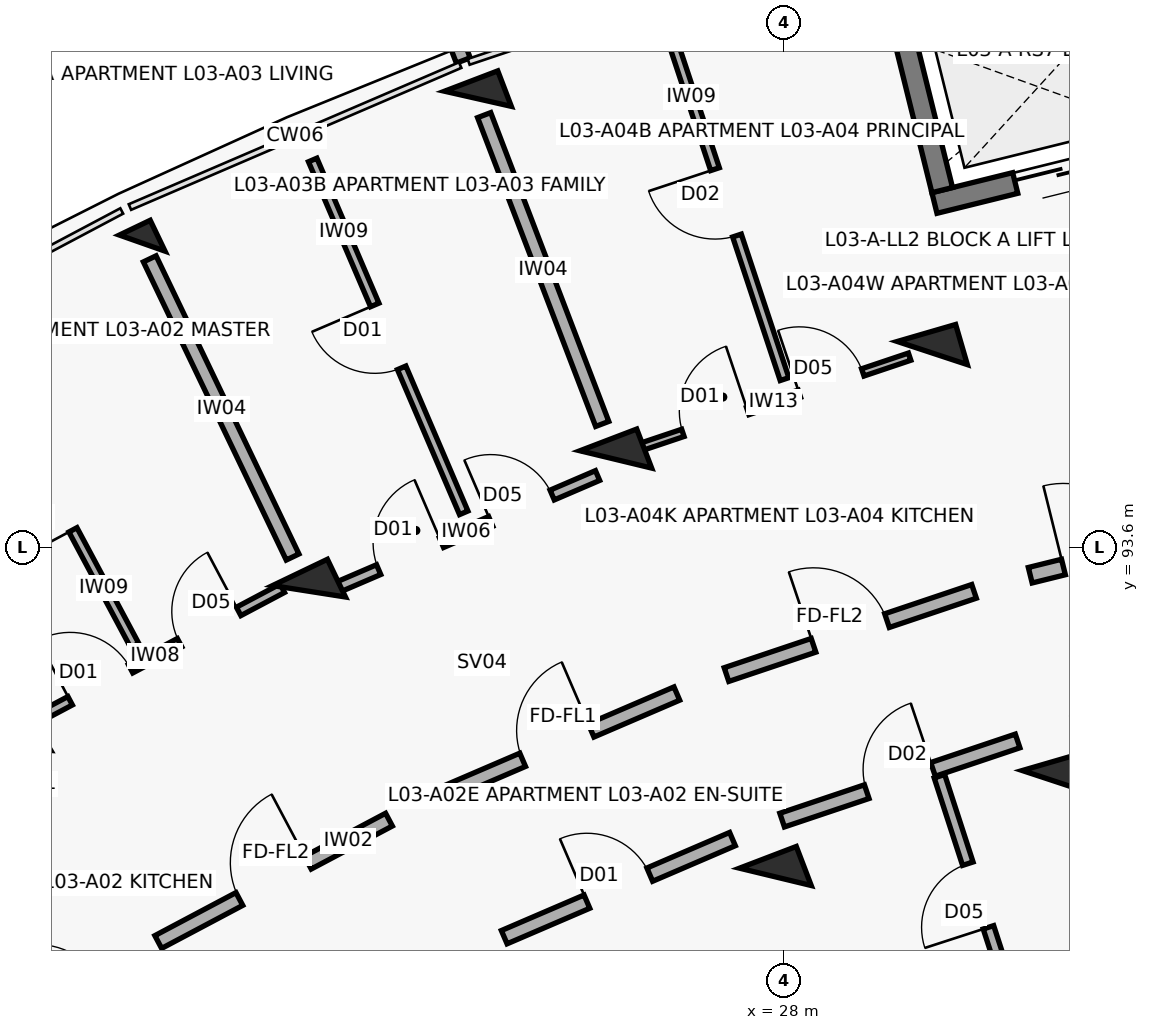
"""IFC4 building model, lengths in metres.
Left out: names, types, materials, properties, quantities, classifications, styles, units other than length and angle.
Written with IfcOpenShell. Run it as: python <this file> out.ifc"""

import sys

from ifc_helpers import new_model, si_unit, direction, frame, frame_2d, origin, origin_2d, place, context, subcontext, project, spatial, rectangle, extrude, element, fill, save


model = new_model("IFC4")
c1 = context("Model", 3, precision=1e-05, world=origin(), true_north=direction((0.0, 1.0)))
c2 = subcontext(c1, "Body", "Model", "MODEL_VIEW")
j1 = project(units=[si_unit("LENGTHUNIT", "METRE"), si_unit("PLANEANGLEUNIT", "RADIAN")], contexts=[c1])
p1 = place(None, origin())
s1 = spatial("IfcSite", under=j1, at=p1, CompositionType="ELEMENT")
p2 = place(p1, origin())
s2 = spatial("IfcBuilding", under=s1, at=p2, CompositionType="ELEMENT")
p3 = place(p2, frame((0.0, 0.0, 11.2)))
s3 = spatial("IfcBuildingStorey", under=s2, at=p3, CompositionType="ELEMENT", Elevation=11.2)
p4 = place(p3, frame((21.754, 93.019, 0.0), z_axis=(0.0, 0.0, 1.0), x_axis=(-0.432085748802, 0.901832526405, 0.0)))
e1 = element("IfcColumn", 1, at=p4, inside=s3, PredefinedType="COLUMN", context=c2, shape_type="SweptSolid", body=[
    extrude(rectangle(XDim=0.55, YDim=0.8, at=origin_2d()), origin(), (0.0, 0.0, 1.0), 3.1),
])
p5 = place(p3, frame((19.559, 97.6, 0.0), z_axis=(0.0, 0.0, 1.0), x_axis=(-0.432085748802, 0.901832526405, 0.0)))
e2 = element("IfcColumn", 2, at=p5, inside=s3, PredefinedType="COLUMN", context=c2, shape_type="SweptSolid", body=[
    extrude(rectangle(XDim=0.45, YDim=0.45, at=origin_2d()), origin(), (0.0, 0.0, 1.0), 3.1),
])
for number, where, z_axis, x_axis in (
    (3, (27.889, 89.261, 0.0), (0.0, 0.0, 1.0), (-0.357, 0.934, 0.0)),
    (4, (25.79, 94.753, 0.0), (0.0, 0.0, 1.0), (-0.357, 0.934, 0.0)),
):
    element("IfcColumn", number, at=place(p3, frame(where, z_axis=z_axis, x_axis=x_axis)), inside=s3, PredefinedType="COLUMN", context=c2, shape_type="SweptSolid", body=[
        extrude(rectangle(XDim=0.55, YDim=0.8, at=origin_2d()), origin(), (0.0, 0.0, 1.0), 3.1),
    ])
p6 = place(p3, frame((23.976, 99.499, 0.0), z_axis=(0.0, 0.0, 1.0), x_axis=(-0.357064076459, 0.934079892355, 0.0)))
e5 = element("IfcColumn", 5, at=p6, inside=s3, PredefinedType="COLUMN", context=c2, shape_type="SweptSolid", body=[
    extrude(rectangle(XDim=0.5, YDim=0.75, at=origin_2d()), origin(), (0.0, 0.0, 1.0), 3.1),
])
for number, where, z_axis, x_axis in (
    (6, (31.599, 90.508, 0.0), (0.0, 0.0, 1.0), (-0.28, 0.96, 0.0)),
    (7, (29.954, 96.153, 0.0), (0.0, 0.0, 1.0), (-0.28, 0.96, 0.0)),
):
    element("IfcColumn", number, at=place(p3, frame(where, z_axis=z_axis, x_axis=x_axis)), inside=s3, PredefinedType="COLUMN", context=c2, shape_type="SweptSolid", body=[
        extrude(rectangle(XDim=0.55, YDim=0.8, at=origin_2d()), origin(), (0.0, 0.0, 1.0), 3.1),
    ])
p7 = place(p3, frame((23.783, 100.003, 0.0), z_axis=(0.0, 0.0, 1.0), x_axis=(-0.356942580168, 0.934126326823, 0.0)))
e8 = element("IfcWall", 8, at=p7, inside=s3, PredefinedType="PARAPET", context=c2, shape_type="SweptSolid", body=[
    extrude(rectangle(XDim=0.9, YDim=0.195, at=frame_2d((0.45, 0.0))), origin(), (0.0, 0.0, 1.0), 2.25),
])
p8 = place(p3, frame((33.273, 98.942, 0.0), z_axis=(0.0, 0.0, 1.0), x_axis=(-0.970707542441, -0.240264160972, 0.0)))
e9 = element("IfcWall", 9, at=p8, inside=s3, PredefinedType="SHEAR", context=c2, shape_type="SweptSolid", body=[
    extrude(rectangle(XDim=3.39, YDim=0.28, at=frame_2d((1.695, 0.0))), origin(), (0.0, 0.0, 1.0), 3.1),
])
p9 = place(p8, frame((1.095, 0.0, 0.0)))
e10 = element("IfcOpeningElement", 10, at=p9, cuts=e9, PredefinedType="OPENING", context=c2, shape_type="SweptSolid", body=[
    extrude(rectangle(XDim=1.2, YDim=2.15, at=frame_2d((0.6, 1.075))), frame((0.0, 0.15, 0.0), z_axis=(0.0, -1.0, 0.0), x_axis=(1.0, 0.0, 0.0)), (0.0, 0.0, 1.0), 0.3),
])
p10 = place(p3, frame((30.085, 98.297, 0.0), z_axis=(0.0, 0.0, 1.0), x_axis=(-0.2402993748, 0.970698825832, 0.0)))
e11 = element("IfcWall", 11, at=p10, inside=s3, PredefinedType="SHEAR", context=c2, shape_type="SweptSolid", body=[
    extrude(rectangle(XDim=2.03, YDim=0.28, at=frame_2d((1.015, 0.0))), origin(), (0.0, 0.0, 1.0), 3.1),
])
p11 = place(p3, frame((19.77, 88.404, 0.0), z_axis=(0.0, 0.0, 1.0), x_axis=(0.883410853063, 0.468599258099, 0.0)))
e12 = element("IfcWall", 12, at=p11, inside=s3, PredefinedType="SOLIDWALL", context=c2, shape_type="SweptSolid", body=[
    extrude(rectangle(XDim=3.436, YDim=0.19, at=frame_2d((1.718, 0.0))), origin(), (0.0, 0.0, 1.0), 2.08),
])
p12 = place(p11, frame((1.208, 0.0, 0.0)))
e13 = element("IfcOpeningElement", 13, at=p12, cuts=e12, PredefinedType="OPENING", context=c2, shape_type="SweptSolid", body=[
    extrude(rectangle(XDim=1.02, YDim=2.15, at=frame_2d((0.51, 1.075))), frame((0.0, 0.105, 0.0), z_axis=(0.0, -1.0, 0.0), x_axis=(1.0, 0.0, 0.0)), (0.0, 0.0, 1.0), 0.21),
])
p13 = place(p3, frame((18.037, 91.273, 0.0), z_axis=(0.0, 0.0, 1.0), x_axis=(0.883441603894, 0.468541281543, 0.0)))
e14 = element("IfcWall", 14, at=p13, inside=s3, PredefinedType="PARTITIONING", context=c2, shape_type="SweptSolid", body=[
    extrude(rectangle(XDim=3.81, YDim=0.125, at=frame_2d((1.905, 0.0))), origin(), (0.0, 0.0, 1.0), 2.08),
])
p14 = place(p13, frame((0.65, 0.0, 0.0)))
e15 = element("IfcOpeningElement", 15, at=p14, cuts=e14, PredefinedType="OPENING", context=c2, shape_type="SweptSolid", body=[
    extrude(rectangle(XDim=0.9, YDim=2.1, at=frame_2d((0.45, 1.05))), frame((0.0, 0.073, 0.0), z_axis=(0.0, -1.0, 0.0), x_axis=(1.0, 0.0, 0.0)), (0.0, 0.0, 1.0), 0.145),
])
p15 = place(p13, frame((2.28, 0.0, 0.0)))
e16 = element("IfcOpeningElement", 16, at=p15, cuts=e14, PredefinedType="OPENING", context=c2, shape_type="SweptSolid", body=[
    extrude(rectangle(XDim=0.88, YDim=2.1, at=frame_2d((0.44, 1.05))), frame((0.0, 0.073, 0.0), z_axis=(0.0, -1.0, 0.0), x_axis=(1.0, 0.0, 0.0)), (0.0, 0.0, 1.0), 0.145),
])
p16 = place(p3, frame((19.46, 92.306, 0.0), z_axis=(0.0, 0.0, 1.0), x_axis=(-0.471228378949, 0.88201123285, 0.0)))
e17 = element("IfcWall", 17, at=p16, inside=s3, PredefinedType="PARTITIONING", context=c2, shape_type="SweptSolid", body=[
    extrude(rectangle(XDim=4.75, YDim=0.12, at=frame_2d((2.375, 0.0))), origin(), (0.0, 0.0, 1.0), 2.08),
])
p17 = place(p16, frame((1.725, 0.0, 0.0)))
e18 = element("IfcOpeningElement", 18, at=p17, cuts=e17, PredefinedType="OPENING", context=c2, shape_type="SweptSolid", body=[
    extrude(rectangle(XDim=1.3, YDim=2.1, at=frame_2d((0.65, 1.05))), frame((0.0, 0.07, 0.0), z_axis=(0.0, -1.0, 0.0), x_axis=(1.0, 0.0, 0.0)), (0.0, 0.0, 1.0), 0.14),
])
p18 = place(p3, frame((23.437, 90.316, 0.0), z_axis=(0.0, 0.0, 1.0), x_axis=(0.918718172399, 0.394913813008, 0.0)))
e19 = element("IfcWall", 19, at=p18, inside=s3, PredefinedType="SOLIDWALL", context=c2, shape_type="SweptSolid", body=[
    extrude(rectangle(XDim=3.436, YDim=0.19, at=frame_2d((1.718, 0.0))), origin(), (0.0, 0.0, 1.0), 2.08),
])
p19 = place(p18, frame((1.228, 0.0, 0.0)))
e20 = element("IfcOpeningElement", 20, at=p19, cuts=e19, PredefinedType="OPENING", context=c2, shape_type="SweptSolid", body=[
    extrude(rectangle(XDim=0.98, YDim=2.15, at=frame_2d((0.49, 1.075))), frame((0.0, 0.105, 0.0), z_axis=(0.0, -1.0, 0.0), x_axis=(1.0, 0.0, 0.0)), (0.0, 0.0, 1.0), 0.21),
])
p20 = place(p3, frame((24.322, 88.467, 0.0), z_axis=(0.0, 0.0, 1.0), x_axis=(0.918723391052, 0.394901672235, 0.0)))
e21 = element("IfcWall", 21, at=p20, inside=s3, PredefinedType="SOLIDWALL", context=c2, shape_type="SweptSolid", body=[
    extrude(rectangle(XDim=3.269, YDim=0.19, at=frame_2d((1.634, 0.0))), origin(), (0.0, 0.0, 1.0), 2.08),
])
p21 = place(p20, frame((1.184, 0.0, 0.0)))
e22 = element("IfcOpeningElement", 22, at=p21, cuts=e21, PredefinedType="OPENING", context=c2, shape_type="SweptSolid", body=[
    extrude(rectangle(XDim=0.9, YDim=2.1, at=frame_2d((0.45, 1.05))), frame((0.0, 0.105, 0.0), z_axis=(0.0, -1.0, 0.0), x_axis=(1.0, 0.0, 0.0)), (0.0, 0.0, 1.0), 0.21),
])
p22 = place(p3, frame((22.073, 93.047, 0.0), z_axis=(0.0, 0.0, 1.0), x_axis=(0.918737522346, 0.394868794707, 0.0)))
e23 = element("IfcWall", 23, at=p22, inside=s3, PredefinedType="PARTITIONING", context=c2, shape_type="SweptSolid", body=[
    extrude(rectangle(XDim=3.785, YDim=0.14, at=frame_2d((1.893, 0.0))), origin(), (0.0, 0.0, 1.0), 2.08),
])
p23 = place(p22, frame((0.65, 0.0, 0.0)))
e24 = element("IfcOpeningElement", 24, at=p23, cuts=e23, PredefinedType="OPENING", context=c2, shape_type="SweptSolid", body=[
    extrude(rectangle(XDim=0.9, YDim=2.1, at=frame_2d((0.45, 1.05))), frame((0.0, 0.08, 0.0), z_axis=(0.0, -1.0, 0.0), x_axis=(1.0, 0.0, 0.0)), (0.0, 0.0, 1.0), 0.16),
])
p24 = place(p22, frame((2.255, 0.0, 0.0)))
e25 = element("IfcOpeningElement", 25, at=p24, cuts=e23, PredefinedType="OPENING", context=c2, shape_type="SweptSolid", body=[
    extrude(rectangle(XDim=0.88, YDim=2.1, at=frame_2d((0.44, 1.05))), frame((0.0, 0.08, 0.0), z_axis=(0.0, -1.0, 0.0), x_axis=(1.0, 0.0, 0.0)), (0.0, 0.0, 1.0), 0.16),
])
p25 = place(p3, frame((23.789, 94.051, 0.0), z_axis=(0.0, 0.0, 1.0), x_axis=(-0.393539995583, 0.919307495823, 0.0)))
e26 = element("IfcWall", 26, at=p25, inside=s3, PredefinedType="PARTITIONING", context=c2, shape_type="SweptSolid", body=[
    extrude(rectangle(XDim=5.05, YDim=0.12, at=frame_2d((2.525, 0.0))), origin(), (0.0, 0.0, 1.0), 2.08),
])
p26 = place(p25, frame((2.075, 0.0, 0.0)))
e27 = element("IfcOpeningElement", 27, at=p26, cuts=e26, PredefinedType="OPENING", context=c2, shape_type="SweptSolid", body=[
    extrude(rectangle(XDim=0.9, YDim=2.1, at=frame_2d((0.45, 1.05))), frame((0.0, 0.07, 0.0), z_axis=(0.0, -1.0, 0.0), x_axis=(1.0, 0.0, 0.0)), (0.0, 0.0, 1.0), 0.14),
])
p27 = place(p3, frame((21.538, 93.469, 0.0), z_axis=(0.0, 0.0, 1.0), x_axis=(-0.432086898897, 0.901831975371, 0.0)))
e28 = element("IfcWall", 28, at=p27, inside=s3, PredefinedType="SOLIDWALL", context=c2, shape_type="SweptSolid", body=[
    extrude(rectangle(XDim=4.35, YDim=0.185, at=frame_2d((2.175, 0.0))), origin(), (0.0, 0.0, 1.0), 2.08),
])
p28 = place(p3, frame((27.247, 91.923, 0.0), z_axis=(0.0, 0.0, 1.0), x_axis=(0.947863007629, 0.318678080151, 0.0)))
e29 = element("IfcWall", 29, at=p28, inside=s3, PredefinedType="SOLIDWALL", context=c2, shape_type="SweptSolid", body=[
    extrude(rectangle(XDim=3.436, YDim=0.19, at=frame_2d((1.718, 0.0))), origin(), (0.0, 0.0, 1.0), 2.08),
])
p29 = place(p28, frame((1.208, 0.0, 0.0)))
e30 = element("IfcOpeningElement", 30, at=p29, cuts=e29, PredefinedType="OPENING", context=c2, shape_type="SweptSolid", body=[
    extrude(rectangle(XDim=1.02, YDim=2.15, at=frame_2d((0.51, 1.075))), frame((0.0, 0.105, 0.0), z_axis=(0.0, -1.0, 0.0), x_axis=(1.0, 0.0, 0.0)), (0.0, 0.0, 1.0), 0.21),
])
p30 = place(p3, frame((27.979, 90.008, 0.0), z_axis=(0.0, 0.0, 1.0), x_axis=(0.94787351033, 0.318646839643, 0.0)))
e31 = element("IfcWall", 31, at=p30, inside=s3, PredefinedType="SOLIDWALL", context=c2, shape_type="SweptSolid", body=[
    extrude(rectangle(XDim=3.269, YDim=0.19, at=frame_2d((1.634, 0.0))), origin(), (0.0, 0.0, 1.0), 2.08),
])
p31 = place(p30, frame((1.174, 0.0, 0.0)))
e32 = element("IfcOpeningElement", 32, at=p31, cuts=e31, PredefinedType="OPENING", context=c2, shape_type="SweptSolid", body=[
    extrude(rectangle(XDim=0.92, YDim=2.1, at=frame_2d((0.46, 1.05))), frame((0.0, 0.105, 0.0), z_axis=(0.0, -1.0, 0.0), x_axis=(1.0, 0.0, 0.0)), (0.0, 0.0, 1.0), 0.21),
])
p32 = place(p3, frame((31.066, 87.446, 0.0), z_axis=(0.0, 0.0, 1.0), x_axis=(-0.308582493915, 0.951197584337, 0.0)))
e33 = element("IfcWall", 33, at=p32, inside=s3, PredefinedType="PARTITIONING", context=c2, shape_type="SweptSolid", body=[
    extrude(rectangle(XDim=3.3, YDim=0.145, at=frame_2d((1.65, 0.0))), origin(), (0.0, 0.0, 1.0), 2.08),
])
p33 = place(p32, frame((1.21, 0.0, 0.0)))
e34 = element("IfcOpeningElement", 34, at=p33, cuts=e33, PredefinedType="OPENING", context=c2, shape_type="SweptSolid", body=[
    extrude(rectangle(XDim=0.88, YDim=2.1, at=frame_2d((0.44, 1.05))), frame((0.0, 0.083, 0.0), z_axis=(0.0, -1.0, 0.0), x_axis=(1.0, 0.0, 0.0)), (0.0, 0.0, 1.0), 0.165),
])
p34 = place(p3, frame((26.056, 94.896, 0.0), z_axis=(0.0, 0.0, 1.0), x_axis=(0.947876567739, 0.318637744673, 0.0)))
e35 = element("IfcWall", 35, at=p34, inside=s3, PredefinedType="PARTITIONING", context=c2, shape_type="SweptSolid", body=[
    extrude(rectangle(XDim=3.797, YDim=0.1, at=frame_2d((1.899, 0.0))), origin(), (0.0, 0.0, 1.0), 2.08),
])
p35 = place(p34, frame((0.65, 0.0, 0.0)))
e36 = element("IfcOpeningElement", 36, at=p35, cuts=e35, PredefinedType="OPENING", context=c2, shape_type="SweptSolid", body=[
    extrude(rectangle(XDim=0.9, YDim=2.1, at=frame_2d((0.45, 1.05))), frame((0.0, 0.06, 0.0), z_axis=(0.0, -1.0, 0.0), x_axis=(1.0, 0.0, 0.0)), (0.0, 0.0, 1.0), 0.12),
])
p36 = place(p34, frame((2.267, 0.0, 0.0)))
e37 = element("IfcOpeningElement", 37, at=p36, cuts=e35, PredefinedType="OPENING", context=c2, shape_type="SweptSolid", body=[
    extrude(rectangle(XDim=0.88, YDim=2.1, at=frame_2d((0.44, 1.05))), frame((0.0, 0.06, 0.0), z_axis=(0.0, -1.0, 0.0), x_axis=(1.0, 0.0, 0.0)), (0.0, 0.0, 1.0), 0.12),
])
p37 = place(p3, frame((28.01, 95.81, 0.0), z_axis=(0.0, 0.0, 1.0), x_axis=(-0.314343770763, 0.949309219266, 0.0)))
e38 = element("IfcWall", 38, at=p37, inside=s3, PredefinedType="PARTITIONING", context=c2, shape_type="SweptSolid", body=[
    extrude(rectangle(XDim=4.9, YDim=0.12, at=frame_2d((2.45, 0.0))), origin(), (0.0, 0.0, 1.0), 2.08),
])
p38 = place(p37, frame((1.99, 0.0, 0.0)))
e39 = element("IfcOpeningElement", 39, at=p38, cuts=e38, PredefinedType="OPENING", context=c2, shape_type="SweptSolid", body=[
    extrude(rectangle(XDim=0.92, YDim=2.1, at=frame_2d((0.46, 1.05))), frame((0.0, 0.07, 0.0), z_axis=(0.0, -1.0, 0.0), x_axis=(1.0, 0.0, 0.0)), (0.0, 0.0, 1.0), 0.14),
])
p39 = place(p3, frame((25.611, 95.22, 0.0), z_axis=(0.0, 0.0, 1.0), x_axis=(-0.357064016205, 0.934079915388, 0.0)))
e40 = element("IfcWall", 40, at=p39, inside=s3, PredefinedType="SOLIDWALL", context=c2, shape_type="SweptSolid", body=[
    extrude(rectangle(XDim=4.35, YDim=0.185, at=frame_2d((2.175, 0.0))), origin(), (0.0, 0.0, 1.0), 2.08),
])
p40 = place(p3, frame((31.243, 93.23, 0.0), z_axis=(0.0, 0.0, 1.0), x_axis=(0.970719238682, 0.240216901263, 0.0)))
e41 = element("IfcWall", 41, at=p40, inside=s3, PredefinedType="SOLIDWALL", context=c2, shape_type="SweptSolid", body=[
    extrude(rectangle(XDim=3.296, YDim=0.21, at=frame_2d((1.648, 0.0))), origin(), (0.0, 0.0, 1.0), 2.08),
])
p41 = place(p40, frame((0.45, 0.0, 0.0)))
e42 = element("IfcOpeningElement", 42, at=p41, cuts=e41, PredefinedType="OPENING", context=c2, shape_type="SweptSolid", body=[
    extrude(rectangle(XDim=1.1, YDim=2.15, at=frame_2d((0.55, 1.075))), frame((0.0, 0.115, 0.0), z_axis=(0.0, -1.0, 0.0), x_axis=(1.0, 0.0, 0.0)), (0.0, 0.0, 1.0), 0.23),
])
p42 = place(p40, frame((1.726, 0.0, 0.0)))
e43 = element("IfcOpeningElement", 43, at=p42, cuts=e41, PredefinedType="OPENING", context=c2, shape_type="SweptSolid", body=[
    extrude(rectangle(XDim=1.12, YDim=2.15, at=frame_2d((0.56, 1.075))), frame((0.0, 0.115, 0.0), z_axis=(0.0, -1.0, 0.0), x_axis=(1.0, 0.0, 0.0)), (0.0, 0.0, 1.0), 0.23),
])
p43 = place(p9, origin())
e44 = element("IfcDoor", 44, at=p43, inside=s3, OperationType="DOUBLE_DOOR_SLIDING", PredefinedType="DOOR", context=c2, shape_type="SweptSolid", body=[
    extrude(rectangle(XDim=1.2, YDim=2.15, at=frame_2d((0.6, 1.075))), frame((0.0, 0.025, 0.0), z_axis=(0.0, -1.0, 0.0), x_axis=(1.0, 0.0, 0.0)), (0.0, 0.0, 1.0), 0.05),
])
fill(e10, e44)
p44 = place(p12, origin())
e45 = element("IfcDoor", 45, at=p44, inside=s3, OperationType="SINGLE_SWING_RIGHT", PredefinedType="DOOR", context=c2, shape_type="SweptSolid", body=[
    extrude(rectangle(XDim=1.02, YDim=2.15, at=frame_2d((0.51, 1.075))), frame((0.0, 0.025, 0.0), z_axis=(0.0, -1.0, 0.0), x_axis=(1.0, 0.0, 0.0)), (0.0, 0.0, 1.0), 0.05),
])
fill(e13, e45)
p45 = place(p14, origin())
e46 = element("IfcDoor", 46, at=p45, inside=s3, OperationType="SINGLE_SWING_LEFT", PredefinedType="DOOR", context=c2, shape_type="SweptSolid", body=[
    extrude(rectangle(XDim=0.9, YDim=2.1, at=frame_2d((0.45, 1.05))), frame((0.0, 0.025, 0.0), z_axis=(0.0, -1.0, 0.0), x_axis=(1.0, 0.0, 0.0)), (0.0, 0.0, 1.0), 0.05),
])
fill(e15, e46)
p46 = place(p15, origin())
e47 = element("IfcDoor", 47, at=p46, inside=s3, OperationType="SINGLE_SWING_RIGHT", PredefinedType="DOOR", context=c2, shape_type="SweptSolid", body=[
    extrude(rectangle(XDim=0.88, YDim=2.1, at=frame_2d((0.44, 1.05))), frame((0.0, 0.025, 0.0), z_axis=(0.0, -1.0, 0.0), x_axis=(1.0, 0.0, 0.0)), (0.0, 0.0, 1.0), 0.05),
])
fill(e16, e47)
p47 = place(p17, origin())
e48 = element("IfcDoor", 48, at=p47, inside=s3, OperationType="SINGLE_SWING_LEFT", PredefinedType="DOOR", context=c2, shape_type="SweptSolid", body=[
    extrude(rectangle(XDim=1.3, YDim=2.1, at=frame_2d((0.65, 1.05))), frame((0.0, 0.025, 0.0), z_axis=(0.0, -1.0, 0.0), x_axis=(1.0, 0.0, 0.0)), (0.0, 0.0, 1.0), 0.05),
])
fill(e18, e48)
p48 = place(p19, origin())
e49 = element("IfcDoor", 49, at=p48, inside=s3, OperationType="SINGLE_SWING_RIGHT", PredefinedType="DOOR", context=c2, shape_type="SweptSolid", body=[
    extrude(rectangle(XDim=0.98, YDim=2.15, at=frame_2d((0.49, 1.075))), frame((0.0, 0.025, 0.0), z_axis=(0.0, -1.0, 0.0), x_axis=(1.0, 0.0, 0.0)), (0.0, 0.0, 1.0), 0.05),
])
fill(e20, e49)
p49 = place(p21, origin())
e50 = element("IfcDoor", 50, at=p49, inside=s3, OperationType="SINGLE_SWING_LEFT", PredefinedType="DOOR", context=c2, shape_type="SweptSolid", body=[
    extrude(rectangle(XDim=0.9, YDim=2.1, at=frame_2d((0.45, 1.05))), frame((0.0, 0.025, 0.0), z_axis=(0.0, -1.0, 0.0), x_axis=(1.0, 0.0, 0.0)), (0.0, 0.0, 1.0), 0.05),
])
fill(e22, e50)
p50 = place(p23, origin())
e51 = element("IfcDoor", 51, at=p50, inside=s3, OperationType="SINGLE_SWING_RIGHT", PredefinedType="DOOR", context=c2, shape_type="SweptSolid", body=[
    extrude(rectangle(XDim=0.9, YDim=2.1, at=frame_2d((0.45, 1.05))), frame((0.0, 0.025, 0.0), z_axis=(0.0, -1.0, 0.0), x_axis=(1.0, 0.0, 0.0)), (0.0, 0.0, 1.0), 0.05),
])
fill(e24, e51)
p51 = place(p24, origin())
e52 = element("IfcDoor", 52, at=p51, inside=s3, OperationType="SINGLE_SWING_LEFT", PredefinedType="DOOR", context=c2, shape_type="SweptSolid", body=[
    extrude(rectangle(XDim=0.88, YDim=2.1, at=frame_2d((0.44, 1.05))), frame((0.0, 0.025, 0.0), z_axis=(0.0, -1.0, 0.0), x_axis=(1.0, 0.0, 0.0)), (0.0, 0.0, 1.0), 0.05),
])
fill(e25, e52)
p52 = place(p26, origin())
e53 = element("IfcDoor", 53, at=p52, inside=s3, OperationType="SINGLE_SWING_RIGHT", PredefinedType="DOOR", context=c2, shape_type="SweptSolid", body=[
    extrude(rectangle(XDim=0.9, YDim=2.1, at=frame_2d((0.45, 1.05))), frame((0.0, 0.025, 0.0), z_axis=(0.0, -1.0, 0.0), x_axis=(1.0, 0.0, 0.0)), (0.0, 0.0, 1.0), 0.05),
])
fill(e27, e53)
p53 = place(p29, origin())
e54 = element("IfcDoor", 54, at=p53, inside=s3, OperationType="SINGLE_SWING_LEFT", PredefinedType="DOOR", context=c2, shape_type="SweptSolid", body=[
    extrude(rectangle(XDim=1.02, YDim=2.15, at=frame_2d((0.51, 1.075))), frame((0.0, 0.025, 0.0), z_axis=(0.0, -1.0, 0.0), x_axis=(1.0, 0.0, 0.0)), (0.0, 0.0, 1.0), 0.05),
])
fill(e30, e54)
p54 = place(p31, origin())
e55 = element("IfcDoor", 55, at=p54, inside=s3, OperationType="SINGLE_SWING_RIGHT", PredefinedType="DOOR", context=c2, shape_type="SweptSolid", body=[
    extrude(rectangle(XDim=0.92, YDim=2.1, at=frame_2d((0.46, 1.05))), frame((0.0, 0.025, 0.0), z_axis=(0.0, -1.0, 0.0), x_axis=(1.0, 0.0, 0.0)), (0.0, 0.0, 1.0), 0.05),
])
fill(e32, e55)
p55 = place(p33, origin())
e56 = element("IfcDoor", 56, at=p55, inside=s3, OperationType="SINGLE_SWING_LEFT", PredefinedType="DOOR", context=c2, shape_type="SweptSolid", body=[
    extrude(rectangle(XDim=0.88, YDim=2.1, at=frame_2d((0.44, 1.05))), frame((0.0, 0.025, 0.0), z_axis=(0.0, -1.0, 0.0), x_axis=(1.0, 0.0, 0.0)), (0.0, 0.0, 1.0), 0.05),
])
fill(e34, e56)
p56 = place(p35, origin())
e57 = element("IfcDoor", 57, at=p56, inside=s3, OperationType="SINGLE_SWING_RIGHT", PredefinedType="DOOR", context=c2, shape_type="SweptSolid", body=[
    extrude(rectangle(XDim=0.9, YDim=2.1, at=frame_2d((0.45, 1.05))), frame((0.0, 0.025, 0.0), z_axis=(0.0, -1.0, 0.0), x_axis=(1.0, 0.0, 0.0)), (0.0, 0.0, 1.0), 0.05),
])
fill(e36, e57)
p57 = place(p36, origin())
e58 = element("IfcDoor", 58, at=p57, inside=s3, OperationType="SINGLE_SWING_LEFT", PredefinedType="DOOR", context=c2, shape_type="SweptSolid", body=[
    extrude(rectangle(XDim=0.88, YDim=2.1, at=frame_2d((0.44, 1.05))), frame((0.0, 0.025, 0.0), z_axis=(0.0, -1.0, 0.0), x_axis=(1.0, 0.0, 0.0)), (0.0, 0.0, 1.0), 0.05),
])
fill(e37, e58)
p58 = place(p38, origin())
e59 = element("IfcDoor", 59, at=p58, inside=s3, OperationType="SINGLE_SWING_RIGHT", PredefinedType="DOOR", context=c2, shape_type="SweptSolid", body=[
    extrude(rectangle(XDim=0.92, YDim=2.1, at=frame_2d((0.46, 1.05))), frame((0.0, 0.025, 0.0), z_axis=(0.0, -1.0, 0.0), x_axis=(1.0, 0.0, 0.0)), (0.0, 0.0, 1.0), 0.05),
])
fill(e39, e59)
p59 = place(p41, origin())
e60 = element("IfcDoor", 60, at=p59, inside=s3, OperationType="SINGLE_SWING_LEFT", PredefinedType="DOOR", context=c2, shape_type="SweptSolid", body=[
    extrude(rectangle(XDim=1.1, YDim=2.15, at=frame_2d((0.55, 1.075))), frame((0.0, 0.025, 0.0), z_axis=(0.0, -1.0, 0.0), x_axis=(1.0, 0.0, 0.0)), (0.0, 0.0, 1.0), 0.05),
])
fill(e42, e60)
save(model, sys.argv[1])
